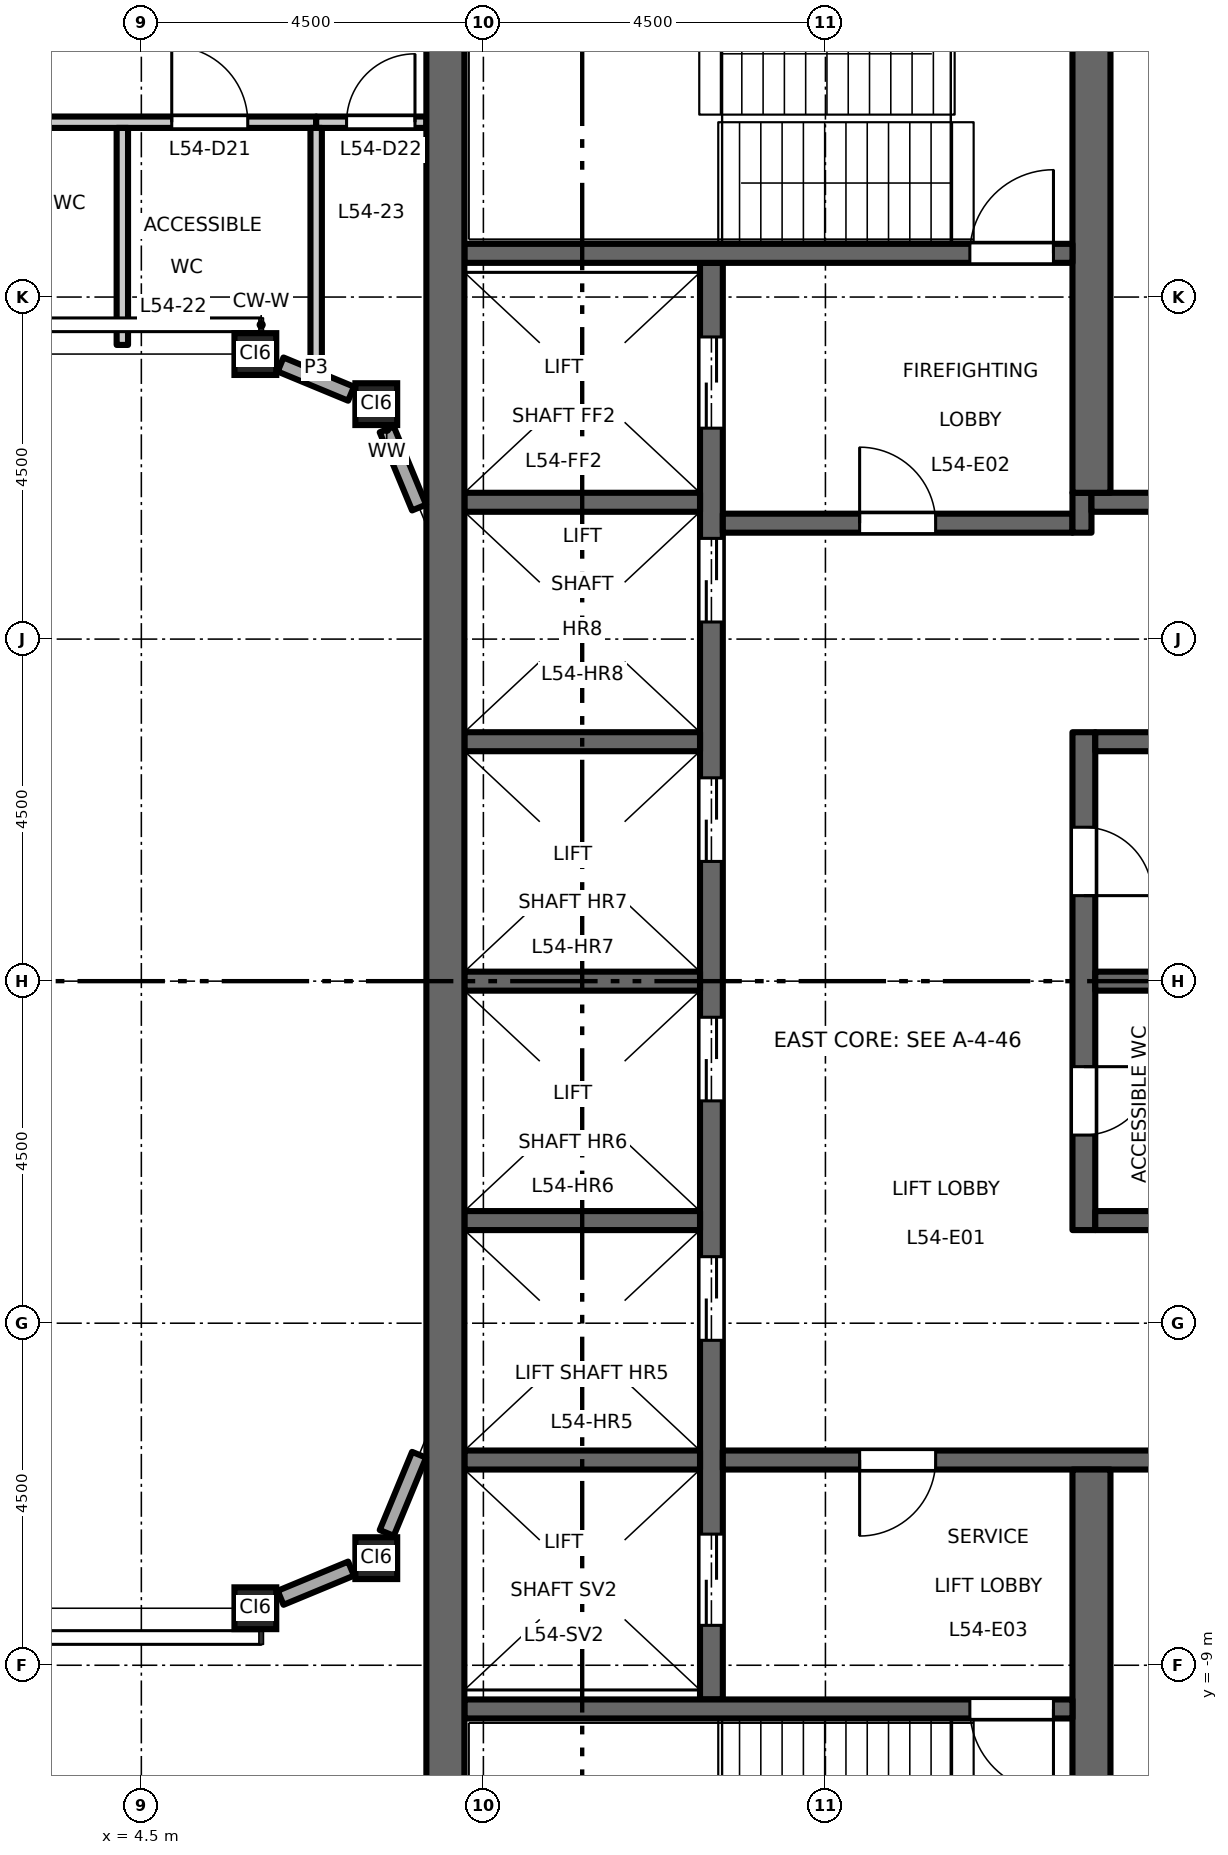
"""IFC4 building model, lengths in metres.
Left out: names, types, materials, properties, quantities, classifications, styles, units other than length and angle.
Written with IfcOpenShell. Run it as: python <this file> out.ifc"""

import sys

from ifc_helpers import new_model, si_unit, direction, frame, frame_2d, origin, origin_2d, place, context, subcontext, project, spatial, rectangle, hollow_rectangle, extrude, element, fill, save


model = new_model("IFC4")
c1 = context("Model", 3, precision=1e-05, world=origin(), true_north=direction((0.0, 1.0)))
c2 = subcontext(c1, "Body", "Model", "MODEL_VIEW")
j1 = project(units=[si_unit("LENGTHUNIT", "METRE"), si_unit("PLANEANGLEUNIT", "RADIAN")], contexts=[c1])
p1 = place(None, origin())
s1 = spatial("IfcSite", under=j1, at=p1, CompositionType="ELEMENT")
p2 = place(p1, origin())
s2 = spatial("IfcBuilding", under=s1, at=p2, CompositionType="ELEMENT")
p3 = place(p2, frame((0.0, 0.0, 251.2)))
s3 = spatial("IfcBuildingStorey", under=s2, at=p3, CompositionType="ELEMENT", Elevation=251.2)
for number, where, z_axis, x_axis in (
    (1, (6.0, -8.25, 0.0), (0.0, 0.0, 1.0), (1.0, 0.0, 0.0)),
    (2, (7.591, -7.591, 0.0), (0.0, 0.0, 1.0), (1.0, 0.0, 0.0)),
    (3, (6.0, 8.25, 0.0), (0.0, 0.0, 1.0), (1.0, 0.0, 0.0)),
    (4, (7.591, 7.591, 0.0), (0.0, 0.0, 1.0), (1.0, 0.0, 0.0)),
):
    element("IfcColumn", number, at=place(p3, frame(where, z_axis=z_axis, x_axis=x_axis)), inside=s3, PredefinedType="COLUMN", context=c2, shape_type="SweptSolid", body=[
        extrude(hollow_rectangle(XDim=0.55, YDim=0.55, WallThickness=0.028, at=origin_2d()), origin(), (0.0, 0.0, 1.0), 4.5),
    ])
p4 = place(p3, frame((12.0, -9.45, 0.0), z_axis=(0.0, 0.0, 1.0), x_axis=(0.0, 1.0, 0.0)))
e5 = element("IfcWall", 5, at=p4, inside=s3, PredefinedType="SHEAR", context=c2, shape_type="SweptSolid", body=[
    extrude(rectangle(XDim=18.9, YDim=0.3, at=frame_2d((9.45, 0.0))), origin(), (0.0, 0.0, 1.0), 4.35),
])
p5 = place(p4, frame((4.725, 0.0, 0.0)))
e6 = element("IfcOpeningElement", 6, at=p5, cuts=e5, PredefinedType="OPENING", context=c2, shape_type="SweptSolid", body=[
    extrude(rectangle(XDim=1.1, YDim=2.1, at=frame_2d((0.55, 1.05))), frame((0.0, 0.16, 0.0), z_axis=(0.0, -1.0, 0.0), x_axis=(1.0, 0.0, 0.0)), (0.0, 0.0, 1.0), 0.32),
])
p6 = place(p4, frame((7.875, 0.0, 0.0)))
e7 = element("IfcOpeningElement", 7, at=p6, cuts=e5, PredefinedType="OPENING", context=c2, shape_type="SweptSolid", body=[
    extrude(rectangle(XDim=1.1, YDim=2.1, at=frame_2d((0.55, 1.05))), frame((0.0, 0.16, 0.0), z_axis=(0.0, -1.0, 0.0), x_axis=(1.0, 0.0, 0.0)), (0.0, 0.0, 1.0), 0.32),
])
p7 = place(p4, frame((11.025, 0.0, 0.0)))
e8 = element("IfcOpeningElement", 8, at=p7, cuts=e5, PredefinedType="OPENING", context=c2, shape_type="SweptSolid", body=[
    extrude(rectangle(XDim=1.1, YDim=2.1, at=frame_2d((0.55, 1.05))), frame((0.0, 0.16, 0.0), z_axis=(0.0, -1.0, 0.0), x_axis=(1.0, 0.0, 0.0)), (0.0, 0.0, 1.0), 0.32),
])
p8 = place(p4, frame((14.175, 0.0, 0.0)))
e9 = element("IfcOpeningElement", 9, at=p8, cuts=e5, PredefinedType="OPENING", context=c2, shape_type="SweptSolid", body=[
    extrude(rectangle(XDim=1.1, YDim=2.1, at=frame_2d((0.55, 1.05))), frame((0.0, 0.16, 0.0), z_axis=(0.0, -1.0, 0.0), x_axis=(1.0, 0.0, 0.0)), (0.0, 0.0, 1.0), 0.32),
])
p9 = place(p4, frame((16.725, 0.0, 0.0)))
e10 = element("IfcOpeningElement", 10, at=p9, cuts=e5, PredefinedType="OPENING", context=c2, shape_type="SweptSolid", body=[
    extrude(rectangle(XDim=1.2, YDim=2.1, at=frame_2d((0.6, 1.05))), frame((0.0, 0.16, 0.0), z_axis=(0.0, -1.0, 0.0), x_axis=(1.0, 0.0, 0.0)), (0.0, 0.0, 1.0), 0.32),
])
p10 = place(p4, frame((0.975, 0.0, 0.0)))
e11 = element("IfcOpeningElement", 11, at=p10, cuts=e5, PredefinedType="OPENING", context=c2, shape_type="SweptSolid", body=[
    extrude(rectangle(XDim=1.2, YDim=2.1, at=frame_2d((0.6, 1.05))), frame((0.0, 0.16, 0.0), z_axis=(0.0, -1.0, 0.0), x_axis=(1.0, 0.0, 0.0)), (0.0, 0.0, 1.0), 0.32),
])
p11 = place(p3, frame((12.15, 6.025, 0.0), z_axis=(0.0, 0.0, 1.0), x_axis=(1.0, 0.0, 0.0)))
e12 = element("IfcWall", 12, at=p11, inside=s3, PredefinedType="SHEAR", context=c2, shape_type="SweptSolid", body=[
    extrude(rectangle(XDim=4.6, YDim=0.25, at=frame_2d((2.3, 0.0))), origin(), (0.0, 0.0, 1.0), 4.35),
])
p12 = place(p11, frame((1.8, 0.0, 0.0)))
e13 = element("IfcOpeningElement", 13, at=p12, cuts=e12, PredefinedType="OPENING", context=c2, shape_type="SweptSolid", body=[
    extrude(rectangle(XDim=1.0, YDim=2.1, at=frame_2d((0.5, 1.05))), frame((0.0, 0.135, 0.0), z_axis=(0.0, -1.0, 0.0), x_axis=(1.0, 0.0, 0.0)), (0.0, 0.0, 1.0), 0.27),
])
p13 = place(p3, frame((16.875, 5.9, 0.0), z_axis=(0.0, 0.0, 1.0), x_axis=(0.0, 1.0, 0.0)))
e14 = element("IfcWall", 14, at=p13, inside=s3, PredefinedType="SHEAR", context=c2, shape_type="SweptSolid", body=[
    extrude(rectangle(XDim=0.525, YDim=0.25, at=frame_2d((0.263, 0.0))), origin(), (0.0, 0.0, 1.0), 4.35),
])
p14 = place(p3, frame((17.0, 6.3, 0.0), z_axis=(0.0, 0.0, 1.0), x_axis=(1.0, 0.0, 0.0)))
e15 = element("IfcWall", 15, at=p14, inside=s3, PredefinedType="SHEAR", context=c2, shape_type="SweptSolid", body=[
    extrude(rectangle(XDim=4.25, YDim=0.25, at=frame_2d((2.125, 0.0))), origin(), (0.0, 0.0, 1.0), 4.35),
])
p15 = place(p3, frame((12.15, -6.3, 0.0), z_axis=(0.0, 0.0, 1.0), x_axis=(1.0, 0.0, 0.0)))
e16 = element("IfcWall", 16, at=p15, inside=s3, PredefinedType="SHEAR", context=c2, shape_type="SweptSolid", body=[
    extrude(rectangle(XDim=9.1, YDim=0.25, at=frame_2d((4.55, 0.0))), origin(), (0.0, 0.0, 1.0), 4.35),
])
p16 = place(p15, frame((1.8, 0.0, 0.0)))
e17 = element("IfcOpeningElement", 17, at=p16, cuts=e16, PredefinedType="OPENING", context=c2, shape_type="SweptSolid", body=[
    extrude(rectangle(XDim=1.0, YDim=2.1, at=frame_2d((0.5, 1.05))), frame((0.0, 0.135, 0.0), z_axis=(0.0, -1.0, 0.0), x_axis=(1.0, 0.0, 0.0)), (0.0, 0.0, 1.0), 0.27),
])
p17 = place(p3, frame((16.9, -3.275, 0.0), z_axis=(0.0, 0.0, 1.0), x_axis=(0.0, 1.0, 0.0)))
e18 = element("IfcWall", 18, at=p17, inside=s3, PredefinedType="SHEAR", context=c2, shape_type="SweptSolid", body=[
    extrude(rectangle(XDim=6.55, YDim=0.3, at=frame_2d((3.275, 0.0))), origin(), (0.0, 0.0, 1.0), 4.35),
])
p18 = place(p17, frame((1.25, 0.0, 0.0)))
e19 = element("IfcOpeningElement", 19, at=p18, cuts=e18, PredefinedType="OPENING", context=c2, shape_type="SweptSolid", body=[
    extrude(rectangle(XDim=0.9, YDim=2.1, at=frame_2d((0.45, 1.05))), frame((0.0, 0.16, 0.0), z_axis=(0.0, -1.0, 0.0), x_axis=(1.0, 0.0, 0.0)), (0.0, 0.0, 1.0), 0.32),
])
p19 = place(p17, frame((4.4, 0.0, 0.0)))
e20 = element("IfcOpeningElement", 20, at=p19, cuts=e18, PredefinedType="OPENING", context=c2, shape_type="SweptSolid", body=[
    extrude(rectangle(XDim=0.9, YDim=2.1, at=frame_2d((0.45, 1.05))), frame((0.0, 0.16, 0.0), z_axis=(0.0, -1.0, 0.0), x_axis=(1.0, 0.0, 0.0)), (0.0, 0.0, 1.0), 0.32),
])
for number, where, z_axis, x_axis in (
    (21, (17.05, 0.0, 0.0), (0.0, 0.0, 1.0), (1.0, 0.0, 0.0)),
    (22, (17.05, 3.15, 0.0), (0.0, 0.0, 1.0), (1.0, 0.0, 0.0)),
    (23, (17.05, -3.15, 0.0), (0.0, 0.0, 1.0), (1.0, 0.0, 0.0)),
):
    element("IfcWall", number, at=place(p3, frame(where, z_axis=z_axis, x_axis=x_axis)), inside=s3, PredefinedType="SHEAR", context=c2, shape_type="SweptSolid", body=[
        extrude(rectangle(XDim=4.2, YDim=0.25, at=frame_2d((2.1, 0.0))), origin(), (0.0, 0.0, 1.0), 4.35),
    ])
for number, where, z_axis, x_axis in (
    (24, (17.0, 6.425, 0.0), (0.0, 0.0, 1.0), (0.0, 1.0, 0.0)),
    (25, (17.0, -13.0, 0.0), (0.0, 0.0, 1.0), (0.0, 1.0, 0.0)),
):
    element("IfcWall", number, at=place(p3, frame(where, z_axis=z_axis, x_axis=x_axis)), inside=s3, PredefinedType="SHEAR", context=c2, shape_type="SweptSolid", body=[
        extrude(rectangle(XDim=6.575, YDim=0.5, at=frame_2d((3.288, 0.0))), origin(), (0.0, 0.0, 1.0), 4.35),
    ])
for number, where, z_axis, x_axis in (
    (26, (8.75, 0.0, 0.0), (0.0, 0.0, 1.0), (1.0, 0.0, 0.0)),
    (27, (8.75, 3.15, 0.0), (0.0, 0.0, 1.0), (1.0, 0.0, 0.0)),
    (28, (8.75, 6.3, 0.0), (0.0, 0.0, 1.0), (1.0, 0.0, 0.0)),
    (29, (8.75, -3.15, 0.0), (0.0, 0.0, 1.0), (1.0, 0.0, 0.0)),
    (30, (8.75, -6.3, 0.0), (0.0, 0.0, 1.0), (1.0, 0.0, 0.0)),
):
    element("IfcWall", number, at=place(p3, frame(where, z_axis=z_axis, x_axis=x_axis)), inside=s3, PredefinedType="SHEAR", context=c2, shape_type="SweptSolid", body=[
        extrude(rectangle(XDim=3.1, YDim=0.25, at=frame_2d((1.55, 0.0))), origin(), (0.0, 0.0, 1.0), 4.35),
    ])
p20 = place(p3, frame((8.75, 9.575, 0.0), z_axis=(0.0, 0.0, 1.0), x_axis=(1.0, 0.0, 0.0)))
e31 = element("IfcWall", 31, at=p20, inside=s3, PredefinedType="SHEAR", context=c2, shape_type="SweptSolid", body=[
    extrude(rectangle(XDim=8.0, YDim=0.25, at=frame_2d((4.0, 0.0))), origin(), (0.0, 0.0, 1.0), 4.35),
])
p21 = place(p20, frame((6.65, 0.0, 0.0)))
e32 = element("IfcOpeningElement", 32, at=p21, cuts=e31, PredefinedType="OPENING", context=c2, shape_type="SweptSolid", body=[
    extrude(rectangle(XDim=1.1, YDim=2.1, at=frame_2d((0.55, 1.05))), frame((0.0, 0.135, 0.0), z_axis=(0.0, -1.0, 0.0), x_axis=(1.0, 0.0, 0.0)), (0.0, 0.0, 1.0), 0.27),
])
p22 = place(p3, frame((8.75, -9.575, 0.0), z_axis=(0.0, 0.0, 1.0), x_axis=(1.0, 0.0, 0.0)))
e33 = element("IfcWall", 33, at=p22, inside=s3, PredefinedType="SHEAR", context=c2, shape_type="SweptSolid", body=[
    extrude(rectangle(XDim=8.0, YDim=0.25, at=frame_2d((4.0, 0.0))), origin(), (0.0, 0.0, 1.0), 4.35),
])
p23 = place(p22, frame((6.65, 0.0, 0.0)))
e34 = element("IfcOpeningElement", 34, at=p23, cuts=e33, PredefinedType="OPENING", context=c2, shape_type="SweptSolid", body=[
    extrude(rectangle(XDim=1.1, YDim=2.1, at=frame_2d((0.55, 1.05))), frame((0.0, 0.135, 0.0), z_axis=(0.0, -1.0, 0.0), x_axis=(1.0, 0.0, 0.0)), (0.0, 0.0, 1.0), 0.27),
])
p24 = place(p3, frame((8.5, -13.0, 0.0), z_axis=(0.0, 0.0, 1.0), x_axis=(0.0, 1.0, 0.0)))
e35 = element("IfcWall", 35, at=p24, inside=s3, PredefinedType="SHEAR", context=c2, shape_type="SweptSolid", body=[
    extrude(rectangle(XDim=26.0, YDim=0.5, at=frame_2d((13.0, 0.0))), origin(), (0.0, 0.0, 1.0), 4.35),
])
p25 = place(p3, frame((6.332, -8.113, 0.0), z_axis=(0.0, 0.0, 1.0), x_axis=(0.923859650767, 0.382731427616, 0.0)))
e36 = element("IfcWall", 36, at=p25, inside=s3, PredefinedType="STANDARD", context=c2, shape_type="SweptSolid", body=[
    extrude(rectangle(XDim=1.003, YDim=0.2, at=frame_2d((0.502, 0.0))), origin(), (0.0, 0.0, 1.0), 3.918),
])
for number, where, z_axis, x_axis in (
    (37, (7.729, -7.259, 0.0), (0.0, 0.0, 1.0), (0.383, 0.924, 0.0)),
    (38, (8.154, 6.231, 0.0), (0.0, 0.0, 1.0), (-0.383, 0.924, 0.0)),
):
    element("IfcWall", number, at=place(p3, frame(where, z_axis=z_axis, x_axis=x_axis)), inside=s3, PredefinedType="STANDARD", context=c2, shape_type="SweptSolid", body=[
        extrude(rectangle(XDim=1.113, YDim=0.2, at=frame_2d((0.556, 0.0))), origin(), (0.0, 0.0, 1.0), 3.918),
    ])
p26 = place(p3, frame((7.259, 7.729, 0.0), z_axis=(0.0, 0.0, 1.0), x_axis=(-0.923859650767, 0.382731427616, 0.0)))
e39 = element("IfcWall", 39, at=p26, inside=s3, PredefinedType="STANDARD", context=c2, shape_type="SweptSolid", body=[
    extrude(rectangle(XDim=1.003, YDim=0.2, at=frame_2d((0.502, 0.0))), origin(), (0.0, 0.0, 1.0), 3.918),
])
p27 = place(p3, frame((-8.25, 11.3, 0.0), z_axis=(0.0, 0.0, 1.0), x_axis=(1.0, 0.0, 0.0)))
e40 = element("IfcWall", 40, at=p27, inside=s3, PredefinedType="PARTITIONING", context=c2, shape_type="SweptSolid", body=[
    extrude(rectangle(XDim=15.05, YDim=0.15, at=frame_2d((7.525, 0.0))), origin(), (0.0, 0.0, 1.0), 4.35),
])
p28 = place(p27, frame((2.65, 0.0, 0.0)))
e41 = element("IfcOpeningElement", 41, at=p28, cuts=e40, PredefinedType="OPENING", context=c2, shape_type="SweptSolid", body=[
    extrude(rectangle(XDim=1.0, YDim=2.1, at=frame_2d((0.5, 1.05))), frame((0.0, 0.085, 0.0), z_axis=(0.0, -1.0, 0.0), x_axis=(1.0, 0.0, 0.0)), (0.0, 0.0, 1.0), 0.17),
])
p29 = place(p27, frame((8.9, 0.0, 0.0)))
e42 = element("IfcOpeningElement", 42, at=p29, cuts=e40, PredefinedType="OPENING", context=c2, shape_type="SweptSolid", body=[
    extrude(rectangle(XDim=1.0, YDim=2.1, at=frame_2d((0.5, 1.05))), frame((0.0, 0.085, 0.0), z_axis=(0.0, -1.0, 0.0), x_axis=(1.0, 0.0, 0.0)), (0.0, 0.0, 1.0), 0.17),
])
p30 = place(p27, frame((13.15, 0.0, 0.0)))
e43 = element("IfcOpeningElement", 43, at=p30, cuts=e40, PredefinedType="OPENING", context=c2, shape_type="SweptSolid", body=[
    extrude(rectangle(XDim=1.0, YDim=2.1, at=frame_2d((0.5, 1.05))), frame((0.0, 0.085, 0.0), z_axis=(0.0, -1.0, 0.0), x_axis=(1.0, 0.0, 0.0)), (0.0, 0.0, 1.0), 0.17),
])
p31 = place(p3, frame((6.8, 11.3, 0.0), z_axis=(0.0, 0.0, 1.0), x_axis=(1.0, 0.0, 0.0)))
e44 = element("IfcWall", 44, at=p31, inside=s3, PredefinedType="PARTITIONING", context=c2, shape_type="SweptSolid", body=[
    extrude(rectangle(XDim=1.45, YDim=0.15, at=frame_2d((0.725, 0.0))), origin(), (0.0, 0.0, 1.0), 4.35),
])
p32 = place(p31, frame((0.4, 0.0, 0.0)))
e45 = element("IfcOpeningElement", 45, at=p32, cuts=e44, PredefinedType="OPENING", context=c2, shape_type="SweptSolid", body=[
    extrude(rectangle(XDim=0.9, YDim=2.1, at=frame_2d((0.45, 1.05))), frame((0.0, 0.085, 0.0), z_axis=(0.0, -1.0, 0.0), x_axis=(1.0, 0.0, 0.0)), (0.0, 0.0, 1.0), 0.17),
])
p33 = place(p3, frame((4.25, 8.37, 0.0), z_axis=(0.0, 0.0, 1.0), x_axis=(0.0, 1.0, 0.0)))
e46 = element("IfcWall", 46, at=p33, inside=s3, PredefinedType="PARTITIONING", context=c2, shape_type="SweptSolid", body=[
    extrude(rectangle(XDim=2.855, YDim=0.15, at=frame_2d((1.427, 0.0))), origin(), (0.0, 0.0, 1.0), 4.35),
])
p34 = place(p3, frame((6.8, 8.069, 0.0), z_axis=(0.0, 0.0, 1.0), x_axis=(0.0, 1.0, 0.0)))
e47 = element("IfcWall", 47, at=p34, inside=s3, PredefinedType="PARTITIONING", context=c2, shape_type="SweptSolid", body=[
    extrude(rectangle(XDim=3.156, YDim=0.15, at=frame_2d((1.578, 0.0))), origin(), (0.0, 0.0, 1.0), 4.35),
])
p35 = place(p12, origin())
e48 = element("IfcDoor", 48, at=p35, inside=s3, OperationType="SINGLE_SWING_RIGHT", PredefinedType="DOOR", context=c2, shape_type="SweptSolid", body=[
    extrude(rectangle(XDim=1.0, YDim=2.1, at=frame_2d((0.5, 1.05))), frame((0.0, 0.025, 0.0), z_axis=(0.0, -1.0, 0.0), x_axis=(1.0, 0.0, 0.0)), (0.0, 0.0, 1.0), 0.05),
])
fill(e13, e48)
p36 = place(p16, origin())
e49 = element("IfcDoor", 49, at=p36, inside=s3, OperationType="SINGLE_SWING_LEFT", PredefinedType="DOOR", context=c2, shape_type="SweptSolid", body=[
    extrude(rectangle(XDim=1.0, YDim=2.1, at=frame_2d((0.5, 1.05))), frame((0.0, 0.025, 0.0), z_axis=(0.0, -1.0, 0.0), x_axis=(1.0, 0.0, 0.0)), (0.0, 0.0, 1.0), 0.05),
])
fill(e17, e49)
p37 = place(p21, origin())
e50 = element("IfcDoor", 50, at=p37, inside=s3, OperationType="SINGLE_SWING_LEFT", PredefinedType="DOOR", context=c2, shape_type="SweptSolid", body=[
    extrude(rectangle(XDim=1.1, YDim=2.1, at=frame_2d((0.55, 1.05))), frame((0.0, 0.025, 0.0), z_axis=(0.0, -1.0, 0.0), x_axis=(1.0, 0.0, 0.0)), (0.0, 0.0, 1.0), 0.05),
])
fill(e32, e50)
p38 = place(p23, origin())
e51 = element("IfcDoor", 51, at=p38, inside=s3, OperationType="SINGLE_SWING_RIGHT", PredefinedType="DOOR", context=c2, shape_type="SweptSolid", body=[
    extrude(rectangle(XDim=1.1, YDim=2.1, at=frame_2d((0.55, 1.05))), frame((0.0, 0.025, 0.0), z_axis=(0.0, -1.0, 0.0), x_axis=(1.0, 0.0, 0.0)), (0.0, 0.0, 1.0), 0.05),
])
fill(e34, e51)
p39 = place(p5, origin())
e52 = element("IfcDoor", 52, at=p39, inside=s3, OperationType="DOUBLE_DOOR_SLIDING", PredefinedType="DOOR", context=c2, shape_type="SweptSolid", body=[
    extrude(rectangle(XDim=1.1, YDim=2.1, at=frame_2d((0.55, 1.05))), frame((0.0, 0.025, 0.0), z_axis=(0.0, -1.0, 0.0), x_axis=(1.0, 0.0, 0.0)), (0.0, 0.0, 1.0), 0.05),
])
fill(e6, e52)
p40 = place(p6, origin())
e53 = element("IfcDoor", 53, at=p40, inside=s3, OperationType="DOUBLE_DOOR_SLIDING", PredefinedType="DOOR", context=c2, shape_type="SweptSolid", body=[
    extrude(rectangle(XDim=1.1, YDim=2.1, at=frame_2d((0.55, 1.05))), frame((0.0, 0.025, 0.0), z_axis=(0.0, -1.0, 0.0), x_axis=(1.0, 0.0, 0.0)), (0.0, 0.0, 1.0), 0.05),
])
fill(e7, e53)
p41 = place(p7, origin())
e54 = element("IfcDoor", 54, at=p41, inside=s3, OperationType="DOUBLE_DOOR_SLIDING", PredefinedType="DOOR", context=c2, shape_type="SweptSolid", body=[
    extrude(rectangle(XDim=1.1, YDim=2.1, at=frame_2d((0.55, 1.05))), frame((0.0, 0.025, 0.0), z_axis=(0.0, -1.0, 0.0), x_axis=(1.0, 0.0, 0.0)), (0.0, 0.0, 1.0), 0.05),
])
fill(e8, e54)
p42 = place(p8, origin())
e55 = element("IfcDoor", 55, at=p42, inside=s3, OperationType="DOUBLE_DOOR_SLIDING", PredefinedType="DOOR", context=c2, shape_type="SweptSolid", body=[
    extrude(rectangle(XDim=1.1, YDim=2.1, at=frame_2d((0.55, 1.05))), frame((0.0, 0.025, 0.0), z_axis=(0.0, -1.0, 0.0), x_axis=(1.0, 0.0, 0.0)), (0.0, 0.0, 1.0), 0.05),
])
fill(e9, e55)
p43 = place(p9, origin())
e56 = element("IfcDoor", 56, at=p43, inside=s3, OperationType="DOUBLE_DOOR_SLIDING", PredefinedType="DOOR", context=c2, shape_type="SweptSolid", body=[
    extrude(rectangle(XDim=1.2, YDim=2.1, at=frame_2d((0.6, 1.05))), frame((0.0, 0.025, 0.0), z_axis=(0.0, -1.0, 0.0), x_axis=(1.0, 0.0, 0.0)), (0.0, 0.0, 1.0), 0.05),
])
fill(e10, e56)
p44 = place(p10, origin())
e57 = element("IfcDoor", 57, at=p44, inside=s3, OperationType="DOUBLE_DOOR_SLIDING", PredefinedType="DOOR", context=c2, shape_type="SweptSolid", body=[
    extrude(rectangle(XDim=1.2, YDim=2.1, at=frame_2d((0.6, 1.05))), frame((0.0, 0.025, 0.0), z_axis=(0.0, -1.0, 0.0), x_axis=(1.0, 0.0, 0.0)), (0.0, 0.0, 1.0), 0.05),
])
fill(e11, e57)
p45 = place(p18, origin())
e58 = element("IfcDoor", 58, at=p45, inside=s3, OperationType="SINGLE_SWING_RIGHT", PredefinedType="DOOR", context=c2, shape_type="SweptSolid", body=[
    extrude(rectangle(XDim=0.9, YDim=2.1, at=frame_2d((0.45, 1.05))), frame((0.0, 0.025, 0.0), z_axis=(0.0, -1.0, 0.0), x_axis=(1.0, 0.0, 0.0)), (0.0, 0.0, 1.0), 0.05),
])
fill(e19, e58)
p46 = place(p19, origin())
e59 = element("IfcDoor", 59, at=p46, inside=s3, OperationType="SINGLE_SWING_LEFT", PredefinedType="DOOR", context=c2, shape_type="SweptSolid", body=[
    extrude(rectangle(XDim=0.9, YDim=2.1, at=frame_2d((0.45, 1.05))), frame((0.0, 0.025, 0.0), z_axis=(0.0, -1.0, 0.0), x_axis=(1.0, 0.0, 0.0)), (0.0, 0.0, 1.0), 0.05),
])
fill(e20, e59)
p47 = place(p30, origin())
e60 = element("IfcDoor", 60, at=p47, inside=s3, OperationType="SINGLE_SWING_LEFT", PredefinedType="DOOR", context=c2, shape_type="SweptSolid", body=[
    extrude(rectangle(XDim=1.0, YDim=2.1, at=frame_2d((0.5, 1.05))), frame((0.0, 0.025, 0.0), z_axis=(0.0, -1.0, 0.0), x_axis=(1.0, 0.0, 0.0)), (0.0, 0.0, 1.0), 0.05),
])
fill(e43, e60)
p48 = place(p32, origin())
e61 = element("IfcDoor", 61, at=p48, inside=s3, OperationType="SINGLE_SWING_RIGHT", PredefinedType="DOOR", context=c2, shape_type="SweptSolid", body=[
    extrude(rectangle(XDim=0.9, YDim=2.1, at=frame_2d((0.45, 1.05))), frame((0.0, 0.025, 0.0), z_axis=(0.0, -1.0, 0.0), x_axis=(1.0, 0.0, 0.0)), (0.0, 0.0, 1.0), 0.05),
])
fill(e45, e61)
save(model, sys.argv[1])
